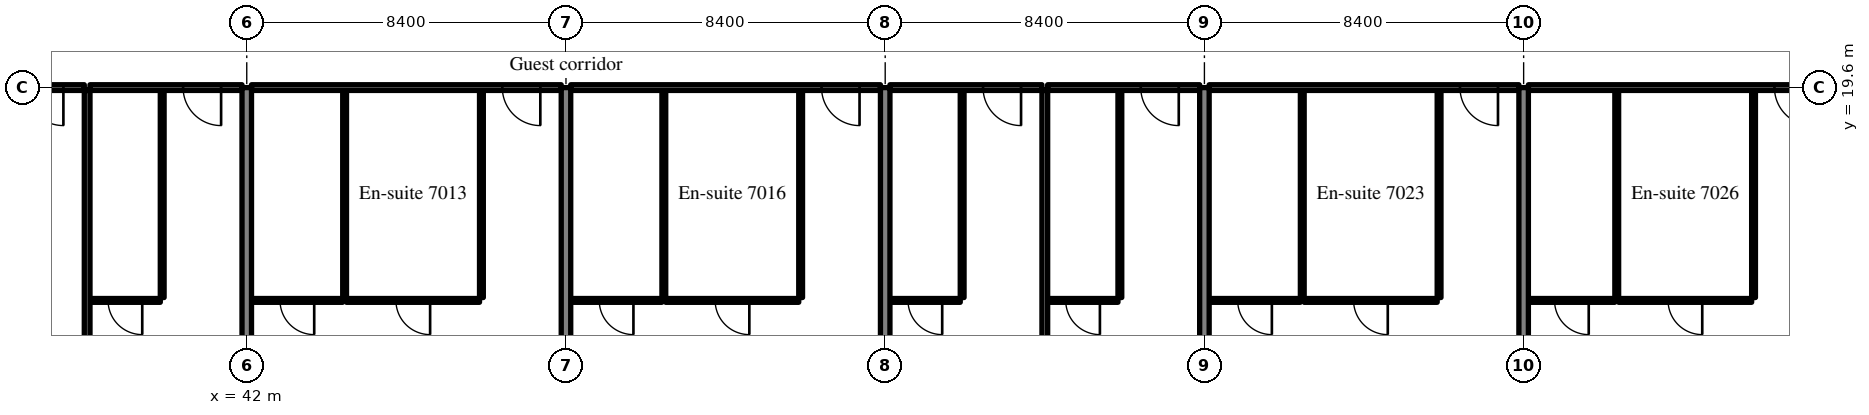
"""IFC4 building model, lengths in metres.
Left out: names, types, materials, properties, quantities, classifications, styles, units other than length and angle.
Written with IfcOpenShell. Run it as: python <this file> out.ifc"""

import sys

from ifc_helpers import new_model, si_unit, direction, frame, frame_2d, origin, place, context, subcontext, project, spatial, rectangle, extrude, source, transform, mapped, element, fill, save


model = new_model("IFC4")
c1 = context("Model", 3, precision=1e-05, world=origin(), true_north=direction((0.0, 1.0)))
c2 = subcontext(c1, "Body", "Model", "MODEL_VIEW")
j1 = project(units=[si_unit("LENGTHUNIT", "METRE"), si_unit("PLANEANGLEUNIT", "RADIAN")], contexts=[c1])
p1 = place(None, origin())
s1 = spatial("IfcSite", under=j1, at=p1, CompositionType="ELEMENT")
p2 = place(p1, origin())
s2 = spatial("IfcBuilding", under=s1, at=p2, CompositionType="ELEMENT")
p3 = place(p2, frame((0.0, 0.0, 293.7)))
s3 = spatial("IfcBuildingStorey", under=s2, at=p3, CompositionType="ELEMENT", Elevation=293.7)
m1 = source(origin(), c2, "Body", "SweptSolid", [
    extrude(rectangle(XDim=14.1, YDim=0.25, at=frame_2d((7.05, 0.0))), origin(), (0.0, 0.0, 1.0), 3.72),
])
p4 = place(p3, frame((42.0, 5.5, 0.0), z_axis=(0.0, 0.0, 1.0), x_axis=(0.0, 1.0, 0.0)))
e1 = element("IfcWall", 1, at=p4, inside=s3, PredefinedType="SHEAR", context=c2, shape_type="MappedRepresentation", body=[
    mapped(m1, transform((0.0, 0.0, 0.0), scale=1.0)),
])
m2 = source(origin(), c2, "Body", "SweptSolid", [
    extrude(rectangle(XDim=13.1, YDim=0.25, at=frame_2d((6.55, 0.0))), origin(), (0.0, 0.0, 1.0), 3.72),
])
p5 = place(p3, frame((50.4, 6.5, 0.0), z_axis=(0.0, 0.0, 1.0), x_axis=(0.0, 1.0, 0.0)))
e2 = element("IfcWall", 2, at=p5, inside=s3, PredefinedType="SHEAR", context=c2, shape_type="MappedRepresentation", body=[
    mapped(m2, transform((0.0, 0.0, 0.0), scale=1.0)),
])
for number, where, z_axis, x_axis in (
    (3, (58.8, 5.5, 0.0), (0.0, 0.0, 1.0), (0.0, 1.0, 0.0)),
    (4, (67.2, 5.5, 0.0), (0.0, 0.0, 1.0), (0.0, 1.0, 0.0)),
    (5, (75.6, 5.5, 0.0), (0.0, 0.0, 1.0), (0.0, 1.0, 0.0)),
):
    element("IfcWall", number, at=place(p3, frame(where, z_axis=z_axis, x_axis=x_axis)), inside=s3, PredefinedType="SHEAR", context=c2, shape_type="MappedRepresentation", body=[
        mapped(m1, transform((0.0, 0.0, 0.0), scale=1.0)),
    ])
m3 = source(origin(), c2, "Body", "SweptSolid", [
    extrude(rectangle(XDim=4.0, YDim=0.15, at=frame_2d((2.0, 0.0))), origin(), (0.0, 0.0, 1.0), 3.02),
])
p6 = place(p3, frame((33.725, 19.6, 0.0), z_axis=(0.0, 0.0, 1.0), x_axis=(1.0, 0.0, 0.0)))
e6 = element("IfcWall", 6, at=p6, inside=s3, PredefinedType="PARTITIONING", context=c2, shape_type="MappedRepresentation", body=[
    mapped(m3, transform((0.0, 0.0, 0.0), scale=1.0)),
])
m4 = source(origin(), c2, "Body", "SweptSolid", [
    extrude(rectangle(XDim=1.0, YDim=2.1, at=frame_2d((0.5, 1.05))), frame((0.0, 0.085, 0.0), z_axis=(0.0, -1.0, 0.0), x_axis=(1.0, 0.0, 0.0)), (0.0, 0.0, 1.0), 0.17),
])
p7 = place(p6, frame((2.45, 0.0, 0.0)))
e7 = element("IfcOpeningElement", 7, at=p7, cuts=e6, PredefinedType="OPENING", context=c2, shape_type="MappedRepresentation", body=[
    mapped(m4, transform((0.0, 0.0, 0.0), scale=1.0)),
])
m5 = source(origin(), c2, "Body", "SweptSolid", [
    extrude(rectangle(XDim=5.45, YDim=0.1, at=frame_2d((2.725, 0.0))), origin(), (0.0, 0.0, 1.0), 3.72),
])
p8 = place(p3, frame((39.775, 14.075, 0.0), z_axis=(0.0, 0.0, 1.0), x_axis=(0.0, 1.0, 0.0)))
e8 = element("IfcWall", 8, at=p8, inside=s3, PredefinedType="PARTITIONING", context=c2, shape_type="MappedRepresentation", body=[
    mapped(m5, transform((0.0, 0.0, 0.0), scale=1.0)),
])
m6 = source(origin(), c2, "Body", "SweptSolid", [
    extrude(rectangle(XDim=1.85, YDim=0.1, at=frame_2d((0.925, 0.0))), origin(), (0.0, 0.0, 1.0), 3.72),
])
p9 = place(p3, frame((37.875, 14.0, 0.0), z_axis=(0.0, 0.0, 1.0), x_axis=(1.0, 0.0, 0.0)))
e9 = element("IfcWall", 9, at=p9, inside=s3, PredefinedType="PARTITIONING", context=c2, shape_type="MappedRepresentation", body=[
    mapped(m6, transform((0.0, 0.0, 0.0), scale=1.0)),
])
m7 = source(origin(), c2, "Body", "SweptSolid", [
    extrude(rectangle(XDim=0.9, YDim=2.1, at=frame_2d((0.45, 1.05))), frame((0.0, 0.06, 0.0), z_axis=(0.0, -1.0, 0.0), x_axis=(1.0, 0.0, 0.0)), (0.0, 0.0, 1.0), 0.12),
])
p10 = place(p9, frame((0.475, 0.0, 0.0)))
e10 = element("IfcOpeningElement", 10, at=p10, cuts=e9, PredefinedType="OPENING", context=c2, shape_type="MappedRepresentation", body=[
    mapped(m7, transform((0.0, 0.0, 0.0), scale=1.0)),
])
p11 = place(p3, frame((37.875, 19.6, 0.0), z_axis=(0.0, 0.0, 1.0), x_axis=(1.0, 0.0, 0.0)))
e11 = element("IfcWall", 11, at=p11, inside=s3, PredefinedType="PARTITIONING", context=c2, shape_type="MappedRepresentation", body=[
    mapped(m3, transform((0.0, 0.0, 0.0), scale=1.0)),
])
p12 = place(p11, frame((2.45, 0.0, 0.0)))
e12 = element("IfcOpeningElement", 12, at=p12, cuts=e11, PredefinedType="OPENING", context=c2, shape_type="MappedRepresentation", body=[
    mapped(m4, transform((0.0, 0.0, 0.0), scale=1.0)),
])
m8 = source(origin(), c2, "Body", "SweptSolid", [
    extrude(rectangle(XDim=15.498, YDim=0.15, at=frame_2d((7.749, 0.0))), origin(), (0.0, 0.0, 1.0), 3.72),
])
p13 = place(p3, frame((37.8, 4.027, 0.0), z_axis=(0.0, 0.0, 1.0), x_axis=(0.0, 1.0, 0.0)))
e13 = element("IfcWall", 13, at=p13, inside=s3, PredefinedType="PARTITIONING", context=c2, shape_type="MappedRepresentation", body=[
    mapped(m8, transform((0.0, 0.0, 0.0), scale=1.0)),
])
for number, where, z_axis, x_axis in (
    (14, (48.175, 14.075, 0.0), (0.0, 0.0, 1.0), (0.0, 1.0, 0.0)),
    (15, (44.575, 14.075, 0.0), (0.0, 0.0, 1.0), (0.0, 1.0, 0.0)),
):
    element("IfcWall", number, at=place(p3, frame(where, z_axis=z_axis, x_axis=x_axis)), inside=s3, PredefinedType="PARTITIONING", context=c2, shape_type="MappedRepresentation", body=[
        mapped(m5, transform((0.0, 0.0, 0.0), scale=1.0)),
    ])
m9 = source(origin(), c2, "Body", "SweptSolid", [
    extrude(rectangle(XDim=3.5, YDim=0.1, at=frame_2d((1.75, 0.0))), origin(), (0.0, 0.0, 1.0), 3.72),
])
p14 = place(p3, frame((44.625, 14.0, 0.0), z_axis=(0.0, 0.0, 1.0), x_axis=(1.0, 0.0, 0.0)))
e16 = element("IfcWall", 16, at=p14, inside=s3, PredefinedType="PARTITIONING", context=c2, shape_type="MappedRepresentation", body=[
    mapped(m9, transform((0.0, 0.0, 0.0), scale=1.0)),
])
p15 = place(p14, frame((1.3, 0.0, 0.0)))
e17 = element("IfcOpeningElement", 17, at=p15, cuts=e16, PredefinedType="OPENING", context=c2, shape_type="MappedRepresentation", body=[
    mapped(m7, transform((0.0, 0.0, 0.0), scale=1.0)),
])
m10 = source(origin(), c2, "Body", "SweptSolid", [
    extrude(rectangle(XDim=2.4, YDim=0.1, at=frame_2d((1.2, 0.0))), origin(), (0.0, 0.0, 1.0), 3.72),
])
p16 = place(p3, frame((42.125, 14.0, 0.0), z_axis=(0.0, 0.0, 1.0), x_axis=(1.0, 0.0, 0.0)))
e18 = element("IfcWall", 18, at=p16, inside=s3, PredefinedType="PARTITIONING", context=c2, shape_type="MappedRepresentation", body=[
    mapped(m10, transform((0.0, 0.0, 0.0), scale=1.0)),
])
p17 = place(p16, frame((0.75, 0.0, 0.0)))
e19 = element("IfcOpeningElement", 19, at=p17, cuts=e18, PredefinedType="OPENING", context=c2, shape_type="MappedRepresentation", body=[
    mapped(m7, transform((0.0, 0.0, 0.0), scale=1.0)),
])
m11 = source(origin(), c2, "Body", "SweptSolid", [
    extrude(rectangle(XDim=8.15, YDim=0.15, at=frame_2d((4.075, 0.0))), origin(), (0.0, 0.0, 1.0), 3.02),
])
p18 = place(p3, frame((42.125, 19.6, 0.0), z_axis=(0.0, 0.0, 1.0), x_axis=(1.0, 0.0, 0.0)))
e20 = element("IfcWall", 20, at=p18, inside=s3, PredefinedType="PARTITIONING", context=c2, shape_type="MappedRepresentation", body=[
    mapped(m11, transform((0.0, 0.0, 0.0), scale=1.0)),
])
p19 = place(p18, frame((6.6, 0.0, 0.0)))
e21 = element("IfcOpeningElement", 21, at=p19, cuts=e20, PredefinedType="OPENING", context=c2, shape_type="MappedRepresentation", body=[
    mapped(m4, transform((0.0, 0.0, 0.0), scale=1.0)),
])
for number, where, z_axis, x_axis in (
    (22, (56.575, 14.075, 0.0), (0.0, 0.0, 1.0), (0.0, 1.0, 0.0)),
    (23, (52.975, 14.075, 0.0), (0.0, 0.0, 1.0), (0.0, 1.0, 0.0)),
):
    element("IfcWall", number, at=place(p3, frame(where, z_axis=z_axis, x_axis=x_axis)), inside=s3, PredefinedType="PARTITIONING", context=c2, shape_type="MappedRepresentation", body=[
        mapped(m5, transform((0.0, 0.0, 0.0), scale=1.0)),
    ])
p20 = place(p3, frame((53.025, 14.0, 0.0), z_axis=(0.0, 0.0, 1.0), x_axis=(1.0, 0.0, 0.0)))
e24 = element("IfcWall", 24, at=p20, inside=s3, PredefinedType="PARTITIONING", context=c2, shape_type="MappedRepresentation", body=[
    mapped(m9, transform((0.0, 0.0, 0.0), scale=1.0)),
])
p21 = place(p20, frame((1.3, 0.0, 0.0)))
e25 = element("IfcOpeningElement", 25, at=p21, cuts=e24, PredefinedType="OPENING", context=c2, shape_type="MappedRepresentation", body=[
    mapped(m7, transform((0.0, 0.0, 0.0), scale=1.0)),
])
m12 = source(origin(), c2, "Body", "SweptSolid", [
    extrude(rectangle(XDim=2.4, YDim=0.1, at=frame_2d((1.2, 0.0))), origin(), (0.0, 0.0, 1.0), 3.72),
])
p22 = place(p3, frame((50.525, 14.0, 0.0), z_axis=(0.0, 0.0, 1.0), x_axis=(1.0, 0.0, 0.0)))
e26 = element("IfcWall", 26, at=p22, inside=s3, PredefinedType="PARTITIONING", context=c2, shape_type="MappedRepresentation", body=[
    mapped(m12, transform((0.0, 0.0, 0.0), scale=1.0)),
])
p23 = place(p22, frame((0.75, 0.0, 0.0)))
e27 = element("IfcOpeningElement", 27, at=p23, cuts=e26, PredefinedType="OPENING", context=c2, shape_type="MappedRepresentation", body=[
    mapped(m7, transform((0.0, 0.0, 0.0), scale=1.0)),
])
m13 = source(origin(), c2, "Body", "SweptSolid", [
    extrude(rectangle(XDim=8.15, YDim=0.15, at=frame_2d((4.075, 0.0))), origin(), (0.0, 0.0, 1.0), 3.02),
])
p24 = place(p3, frame((50.525, 19.6, 0.0), z_axis=(0.0, 0.0, 1.0), x_axis=(1.0, 0.0, 0.0)))
e28 = element("IfcWall", 28, at=p24, inside=s3, PredefinedType="PARTITIONING", context=c2, shape_type="MappedRepresentation", body=[
    mapped(m13, transform((0.0, 0.0, 0.0), scale=1.0)),
])
p25 = place(p24, frame((6.6, 0.0, 0.0)))
e29 = element("IfcOpeningElement", 29, at=p25, cuts=e28, PredefinedType="OPENING", context=c2, shape_type="MappedRepresentation", body=[
    mapped(m4, transform((0.0, 0.0, 0.0), scale=1.0)),
])
p26 = place(p3, frame((60.825, 14.075, 0.0), z_axis=(0.0, 0.0, 1.0), x_axis=(0.0, 1.0, 0.0)))
e30 = element("IfcWall", 30, at=p26, inside=s3, PredefinedType="PARTITIONING", context=c2, shape_type="MappedRepresentation", body=[
    mapped(m5, transform((0.0, 0.0, 0.0), scale=1.0)),
])
m14 = source(origin(), c2, "Body", "SweptSolid", [
    extrude(rectangle(XDim=1.85, YDim=0.1, at=frame_2d((0.925, 0.0))), origin(), (0.0, 0.0, 1.0), 3.72),
])
p27 = place(p3, frame((58.925, 14.0, 0.0), z_axis=(0.0, 0.0, 1.0), x_axis=(1.0, 0.0, 0.0)))
e31 = element("IfcWall", 31, at=p27, inside=s3, PredefinedType="PARTITIONING", context=c2, shape_type="MappedRepresentation", body=[
    mapped(m14, transform((0.0, 0.0, 0.0), scale=1.0)),
])
p28 = place(p27, frame((0.475, 0.0, 0.0)))
e32 = element("IfcOpeningElement", 32, at=p28, cuts=e31, PredefinedType="OPENING", context=c2, shape_type="MappedRepresentation", body=[
    mapped(m7, transform((0.0, 0.0, 0.0), scale=1.0)),
])
p29 = place(p3, frame((58.925, 19.6, 0.0), z_axis=(0.0, 0.0, 1.0), x_axis=(1.0, 0.0, 0.0)))
e33 = element("IfcWall", 33, at=p29, inside=s3, PredefinedType="PARTITIONING", context=c2, shape_type="MappedRepresentation", body=[
    mapped(m3, transform((0.0, 0.0, 0.0), scale=1.0)),
])
p30 = place(p29, frame((2.45, 0.0, 0.0)))
e34 = element("IfcOpeningElement", 34, at=p30, cuts=e33, PredefinedType="OPENING", context=c2, shape_type="MappedRepresentation", body=[
    mapped(m4, transform((0.0, 0.0, 0.0), scale=1.0)),
])
p31 = place(p3, frame((64.975, 14.075, 0.0), z_axis=(0.0, 0.0, 1.0), x_axis=(0.0, 1.0, 0.0)))
e35 = element("IfcWall", 35, at=p31, inside=s3, PredefinedType="PARTITIONING", context=c2, shape_type="MappedRepresentation", body=[
    mapped(m5, transform((0.0, 0.0, 0.0), scale=1.0)),
])
p32 = place(p3, frame((63.075, 14.0, 0.0), z_axis=(0.0, 0.0, 1.0), x_axis=(1.0, 0.0, 0.0)))
e36 = element("IfcWall", 36, at=p32, inside=s3, PredefinedType="PARTITIONING", context=c2, shape_type="MappedRepresentation", body=[
    mapped(m6, transform((0.0, 0.0, 0.0), scale=1.0)),
])
p33 = place(p32, frame((0.475, 0.0, 0.0)))
e37 = element("IfcOpeningElement", 37, at=p33, cuts=e36, PredefinedType="OPENING", context=c2, shape_type="MappedRepresentation", body=[
    mapped(m7, transform((0.0, 0.0, 0.0), scale=1.0)),
])
p34 = place(p3, frame((63.075, 19.6, 0.0), z_axis=(0.0, 0.0, 1.0), x_axis=(1.0, 0.0, 0.0)))
e38 = element("IfcWall", 38, at=p34, inside=s3, PredefinedType="PARTITIONING", context=c2, shape_type="MappedRepresentation", body=[
    mapped(m3, transform((0.0, 0.0, 0.0), scale=1.0)),
])
p35 = place(p34, frame((2.45, 0.0, 0.0)))
e39 = element("IfcOpeningElement", 39, at=p35, cuts=e38, PredefinedType="OPENING", context=c2, shape_type="MappedRepresentation", body=[
    mapped(m4, transform((0.0, 0.0, 0.0), scale=1.0)),
])
p36 = place(p3, frame((63.0, 4.027, 0.0), z_axis=(0.0, 0.0, 1.0), x_axis=(0.0, 1.0, 0.0)))
e40 = element("IfcWall", 40, at=p36, inside=s3, PredefinedType="PARTITIONING", context=c2, shape_type="MappedRepresentation", body=[
    mapped(m8, transform((0.0, 0.0, 0.0), scale=1.0)),
])
for number, where, z_axis, x_axis in (
    (41, (73.375, 14.075, 0.0), (0.0, 0.0, 1.0), (0.0, 1.0, 0.0)),
    (42, (69.775, 14.075, 0.0), (0.0, 0.0, 1.0), (0.0, 1.0, 0.0)),
):
    element("IfcWall", number, at=place(p3, frame(where, z_axis=z_axis, x_axis=x_axis)), inside=s3, PredefinedType="PARTITIONING", context=c2, shape_type="MappedRepresentation", body=[
        mapped(m5, transform((0.0, 0.0, 0.0), scale=1.0)),
    ])
p37 = place(p3, frame((69.825, 14.0, 0.0), z_axis=(0.0, 0.0, 1.0), x_axis=(1.0, 0.0, 0.0)))
e43 = element("IfcWall", 43, at=p37, inside=s3, PredefinedType="PARTITIONING", context=c2, shape_type="MappedRepresentation", body=[
    mapped(m9, transform((0.0, 0.0, 0.0), scale=1.0)),
])
p38 = place(p37, frame((1.3, 0.0, 0.0)))
e44 = element("IfcOpeningElement", 44, at=p38, cuts=e43, PredefinedType="OPENING", context=c2, shape_type="MappedRepresentation", body=[
    mapped(m7, transform((0.0, 0.0, 0.0), scale=1.0)),
])
p39 = place(p3, frame((67.325, 14.0, 0.0), z_axis=(0.0, 0.0, 1.0), x_axis=(1.0, 0.0, 0.0)))
e45 = element("IfcWall", 45, at=p39, inside=s3, PredefinedType="PARTITIONING", context=c2, shape_type="MappedRepresentation", body=[
    mapped(m12, transform((0.0, 0.0, 0.0), scale=1.0)),
])
p40 = place(p39, frame((0.75, 0.0, 0.0)))
e46 = element("IfcOpeningElement", 46, at=p40, cuts=e45, PredefinedType="OPENING", context=c2, shape_type="MappedRepresentation", body=[
    mapped(m7, transform((0.0, 0.0, 0.0), scale=1.0)),
])
p41 = place(p3, frame((67.325, 19.6, 0.0), z_axis=(0.0, 0.0, 1.0), x_axis=(1.0, 0.0, 0.0)))
e47 = element("IfcWall", 47, at=p41, inside=s3, PredefinedType="PARTITIONING", context=c2, shape_type="MappedRepresentation", body=[
    mapped(m13, transform((0.0, 0.0, 0.0), scale=1.0)),
])
p42 = place(p41, frame((6.6, 0.0, 0.0)))
e48 = element("IfcOpeningElement", 48, at=p42, cuts=e47, PredefinedType="OPENING", context=c2, shape_type="MappedRepresentation", body=[
    mapped(m4, transform((0.0, 0.0, 0.0), scale=1.0)),
])
for number, where, z_axis, x_axis in (
    (49, (81.65, 14.075, 0.0), (0.0, 0.0, 1.0), (0.0, 1.0, 0.0)),
    (50, (78.05, 14.075, 0.0), (0.0, 0.0, 1.0), (0.0, 1.0, 0.0)),
):
    element("IfcWall", number, at=place(p3, frame(where, z_axis=z_axis, x_axis=x_axis)), inside=s3, PredefinedType="PARTITIONING", context=c2, shape_type="MappedRepresentation", body=[
        mapped(m5, transform((0.0, 0.0, 0.0), scale=1.0)),
    ])
p43 = place(p3, frame((78.1, 14.0, 0.0), z_axis=(0.0, 0.0, 1.0), x_axis=(1.0, 0.0, 0.0)))
e51 = element("IfcWall", 51, at=p43, inside=s3, PredefinedType="PARTITIONING", context=c2, shape_type="MappedRepresentation", body=[
    mapped(m9, transform((0.0, 0.0, 0.0), scale=1.0)),
])
p44 = place(p43, frame((1.3, 0.0, 0.0)))
e52 = element("IfcOpeningElement", 52, at=p44, cuts=e51, PredefinedType="OPENING", context=c2, shape_type="MappedRepresentation", body=[
    mapped(m7, transform((0.0, 0.0, 0.0), scale=1.0)),
])
m15 = source(origin(), c2, "Body", "SweptSolid", [
    extrude(rectangle(XDim=2.275, YDim=0.1, at=frame_2d((1.137, 0.0))), origin(), (0.0, 0.0, 1.0), 3.72),
])
p45 = place(p3, frame((75.725, 14.0, 0.0), z_axis=(0.0, 0.0, 1.0), x_axis=(1.0, 0.0, 0.0)))
e53 = element("IfcWall", 53, at=p45, inside=s3, PredefinedType="PARTITIONING", context=c2, shape_type="MappedRepresentation", body=[
    mapped(m15, transform((0.0, 0.0, 0.0), scale=1.0)),
])
p46 = place(p45, frame((0.688, 0.0, 0.0)))
e54 = element("IfcOpeningElement", 54, at=p46, cuts=e53, PredefinedType="OPENING", context=c2, shape_type="MappedRepresentation", body=[
    mapped(m7, transform((0.0, 0.0, 0.0), scale=1.0)),
])
m16 = source(origin(), c2, "Body", "SweptSolid", [
    extrude(rectangle(XDim=8.025, YDim=0.15, at=frame_2d((4.012, 0.0))), origin(), (0.0, 0.0, 1.0), 3.02),
])
p47 = place(p3, frame((75.725, 19.6, 0.0), z_axis=(0.0, 0.0, 1.0), x_axis=(1.0, 0.0, 0.0)))
e55 = element("IfcWall", 55, at=p47, inside=s3, PredefinedType="PARTITIONING", context=c2, shape_type="MappedRepresentation", body=[
    mapped(m16, transform((0.0, 0.0, 0.0), scale=1.0)),
])
p48 = place(p47, frame((6.475, 0.0, 0.0)))
e56 = element("IfcOpeningElement", 56, at=p48, cuts=e55, PredefinedType="OPENING", context=c2, shape_type="MappedRepresentation", body=[
    mapped(m4, transform((0.0, 0.0, 0.0), scale=1.0)),
])
m17 = source(origin(), c2, "Body", "SweptSolid", [
    extrude(rectangle(XDim=1.0, YDim=2.1, at=frame_2d((0.5, 1.05))), frame((0.0, 0.025, 0.0), z_axis=(0.0, -1.0, 0.0), x_axis=(1.0, 0.0, 0.0)), (0.0, 0.0, 1.0), 0.05),
])
p49 = place(p7, origin())
e57 = element("IfcDoor", 57, at=p49, inside=s3, OperationType="SINGLE_SWING_RIGHT", PredefinedType="DOOR", context=c2, shape_type="MappedRepresentation", body=[
    mapped(m17, transform((0.0, 0.0, 0.0), scale=1.0)),
])
fill(e7, e57)
m18 = source(origin(), c2, "Body", "SweptSolid", [
    extrude(rectangle(XDim=0.9, YDim=2.1, at=frame_2d((0.45, 1.05))), frame((0.0, 0.025, 0.0), z_axis=(0.0, -1.0, 0.0), x_axis=(1.0, 0.0, 0.0)), (0.0, 0.0, 1.0), 0.05),
])
p50 = place(p10, origin())
e58 = element("IfcDoor", 58, at=p50, inside=s3, OperationType="SINGLE_SWING_RIGHT", PredefinedType="DOOR", context=c2, shape_type="MappedRepresentation", body=[
    mapped(m18, transform((0.0, 0.0, 0.0), scale=1.0)),
])
fill(e10, e58)
p51 = place(p12, origin())
e59 = element("IfcDoor", 59, at=p51, inside=s3, OperationType="SINGLE_SWING_RIGHT", PredefinedType="DOOR", context=c2, shape_type="MappedRepresentation", body=[
    mapped(m17, transform((0.0, 0.0, 0.0), scale=1.0)),
])
fill(e12, e59)
p52 = place(p15, origin())
e60 = element("IfcDoor", 60, at=p52, inside=s3, OperationType="SINGLE_SWING_RIGHT", PredefinedType="DOOR", context=c2, shape_type="MappedRepresentation", body=[
    mapped(m18, transform((0.0, 0.0, 0.0), scale=1.0)),
])
fill(e17, e60)
p53 = place(p17, origin())
e61 = element("IfcDoor", 61, at=p53, inside=s3, OperationType="SINGLE_SWING_RIGHT", PredefinedType="DOOR", context=c2, shape_type="MappedRepresentation", body=[
    mapped(m18, transform((0.0, 0.0, 0.0), scale=1.0)),
])
fill(e19, e61)
p54 = place(p19, origin())
e62 = element("IfcDoor", 62, at=p54, inside=s3, OperationType="SINGLE_SWING_RIGHT", PredefinedType="DOOR", context=c2, shape_type="MappedRepresentation", body=[
    mapped(m17, transform((0.0, 0.0, 0.0), scale=1.0)),
])
fill(e21, e62)
p55 = place(p21, origin())
e63 = element("IfcDoor", 63, at=p55, inside=s3, OperationType="SINGLE_SWING_RIGHT", PredefinedType="DOOR", context=c2, shape_type="MappedRepresentation", body=[
    mapped(m18, transform((0.0, 0.0, 0.0), scale=1.0)),
])
fill(e25, e63)
p56 = place(p23, origin())
e64 = element("IfcDoor", 64, at=p56, inside=s3, OperationType="SINGLE_SWING_RIGHT", PredefinedType="DOOR", context=c2, shape_type="MappedRepresentation", body=[
    mapped(m18, transform((0.0, 0.0, 0.0), scale=1.0)),
])
fill(e27, e64)
p57 = place(p25, origin())
e65 = element("IfcDoor", 65, at=p57, inside=s3, OperationType="SINGLE_SWING_RIGHT", PredefinedType="DOOR", context=c2, shape_type="MappedRepresentation", body=[
    mapped(m17, transform((0.0, 0.0, 0.0), scale=1.0)),
])
fill(e29, e65)
p58 = place(p28, origin())
e66 = element("IfcDoor", 66, at=p58, inside=s3, OperationType="SINGLE_SWING_RIGHT", PredefinedType="DOOR", context=c2, shape_type="MappedRepresentation", body=[
    mapped(m18, transform((0.0, 0.0, 0.0), scale=1.0)),
])
fill(e32, e66)
p59 = place(p30, origin())
e67 = element("IfcDoor", 67, at=p59, inside=s3, OperationType="SINGLE_SWING_RIGHT", PredefinedType="DOOR", context=c2, shape_type="MappedRepresentation", body=[
    mapped(m17, transform((0.0, 0.0, 0.0), scale=1.0)),
])
fill(e34, e67)
p60 = place(p33, origin())
e68 = element("IfcDoor", 68, at=p60, inside=s3, OperationType="SINGLE_SWING_RIGHT", PredefinedType="DOOR", context=c2, shape_type="MappedRepresentation", body=[
    mapped(m18, transform((0.0, 0.0, 0.0), scale=1.0)),
])
fill(e37, e68)
p61 = place(p35, origin())
e69 = element("IfcDoor", 69, at=p61, inside=s3, OperationType="SINGLE_SWING_RIGHT", PredefinedType="DOOR", context=c2, shape_type="MappedRepresentation", body=[
    mapped(m17, transform((0.0, 0.0, 0.0), scale=1.0)),
])
fill(e39, e69)
p62 = place(p38, origin())
e70 = element("IfcDoor", 70, at=p62, inside=s3, OperationType="SINGLE_SWING_RIGHT", PredefinedType="DOOR", context=c2, shape_type="MappedRepresentation", body=[
    mapped(m18, transform((0.0, 0.0, 0.0), scale=1.0)),
])
fill(e44, e70)
p63 = place(p40, origin())
e71 = element("IfcDoor", 71, at=p63, inside=s3, OperationType="SINGLE_SWING_RIGHT", PredefinedType="DOOR", context=c2, shape_type="MappedRepresentation", body=[
    mapped(m18, transform((0.0, 0.0, 0.0), scale=1.0)),
])
fill(e46, e71)
p64 = place(p42, origin())
e72 = element("IfcDoor", 72, at=p64, inside=s3, OperationType="SINGLE_SWING_RIGHT", PredefinedType="DOOR", context=c2, shape_type="MappedRepresentation", body=[
    mapped(m17, transform((0.0, 0.0, 0.0), scale=1.0)),
])
fill(e48, e72)
p65 = place(p44, origin())
e73 = element("IfcDoor", 73, at=p65, inside=s3, OperationType="SINGLE_SWING_RIGHT", PredefinedType="DOOR", context=c2, shape_type="MappedRepresentation", body=[
    mapped(m18, transform((0.0, 0.0, 0.0), scale=1.0)),
])
fill(e52, e73)
p66 = place(p46, origin())
e74 = element("IfcDoor", 74, at=p66, inside=s3, OperationType="SINGLE_SWING_RIGHT", PredefinedType="DOOR", context=c2, shape_type="MappedRepresentation", body=[
    mapped(m18, transform((0.0, 0.0, 0.0), scale=1.0)),
])
fill(e54, e74)
p67 = place(p48, origin())
e75 = element("IfcDoor", 75, at=p67, inside=s3, OperationType="SINGLE_SWING_RIGHT", PredefinedType="DOOR", context=c2, shape_type="MappedRepresentation", body=[
    mapped(m17, transform((0.0, 0.0, 0.0), scale=1.0)),
])
fill(e56, e75)
save(model, sys.argv[1])
